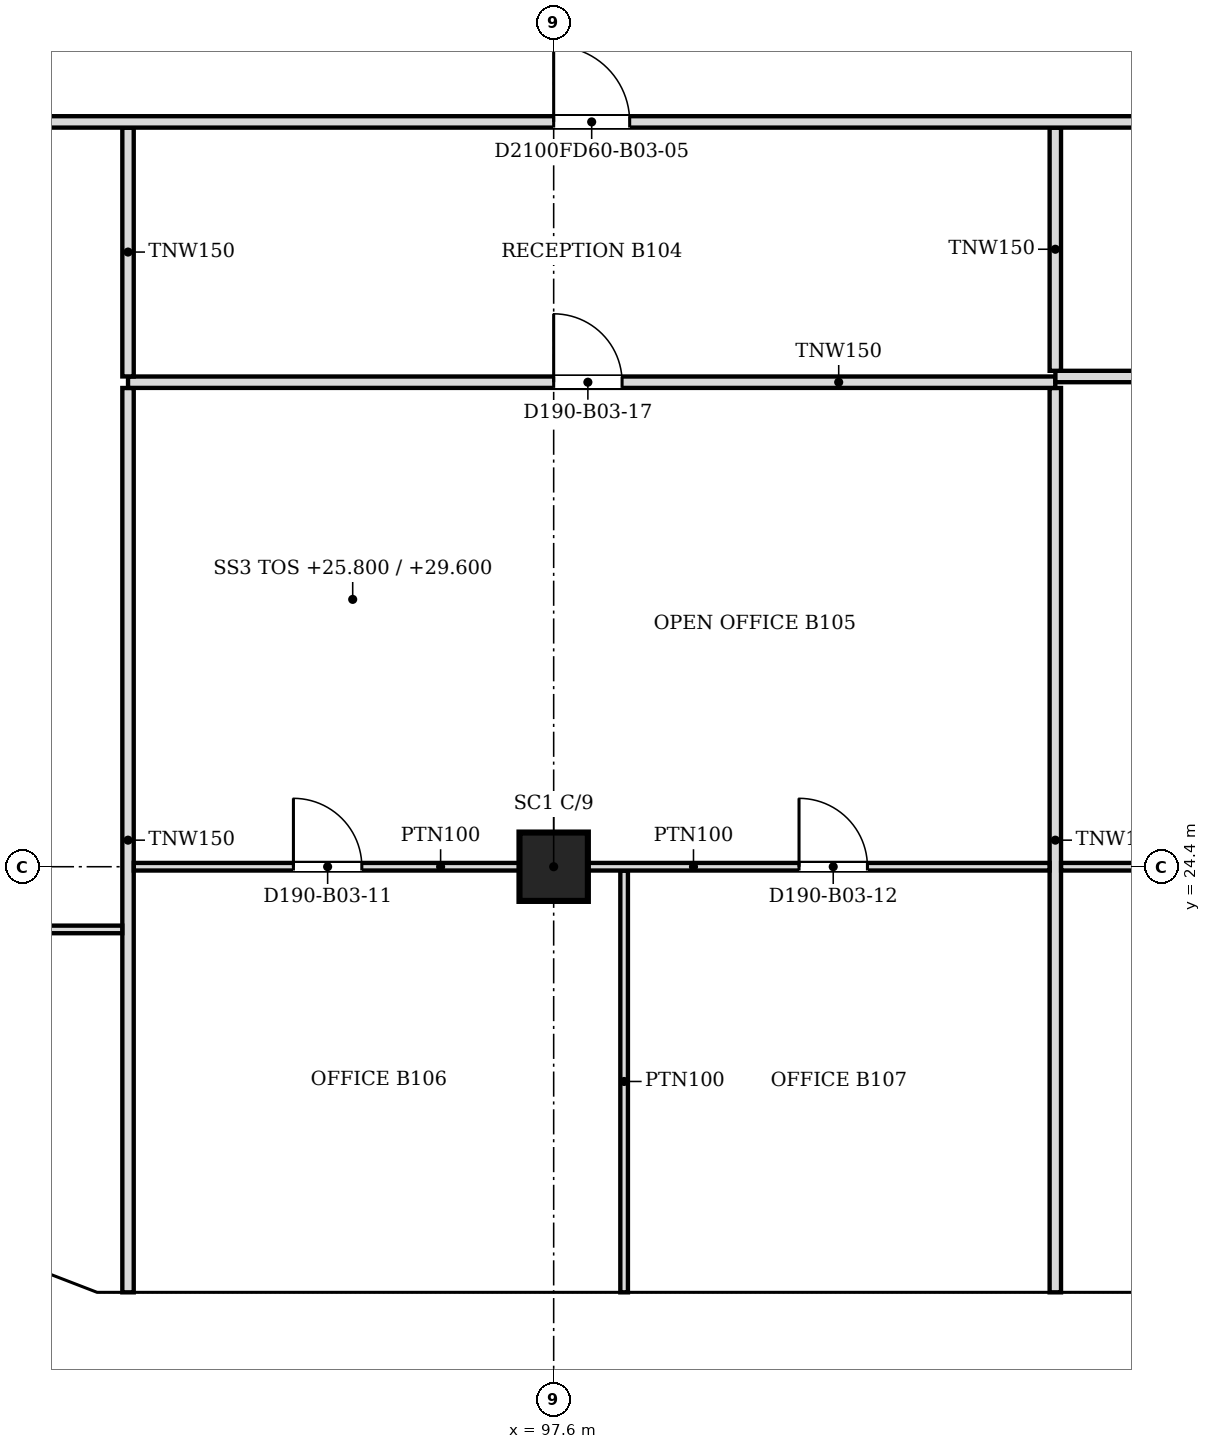
"""IFC4 building model, lengths in metres.
Left out: names, types, materials, properties, quantities, classifications, styles, units other than length and angle.
Written with IfcOpenShell. Run it as: python <this file> out.ifc"""

import sys

from ifc_helpers import new_model, si_unit, direction, frame, frame_2d, origin, origin_2d, place, context, subcontext, project, spatial, polyline, rectangle, outline, extrude, faceted_brep, source, transform, mapped, element, fill, save


model = new_model("IFC4")
c1 = context("Model", 3, precision=1e-05, world=origin(), true_north=direction((0.0, 1.0)))
c2 = subcontext(c1, "Body", "Model", "MODEL_VIEW")
j1 = project(units=[si_unit("LENGTHUNIT", "METRE"), si_unit("PLANEANGLEUNIT", "RADIAN")], contexts=[c1])
p1 = place(None, origin())
s1 = spatial("IfcSite", under=j1, at=p1, CompositionType="ELEMENT")
p2 = place(p1, origin())
s2 = spatial("IfcBuilding", under=s1, at=p2, CompositionType="ELEMENT")
p3 = place(p2, frame((0.0, 0.0, 25.8)))
s3 = spatial("IfcBuildingStorey", under=s2, at=p3, CompositionType="ELEMENT", Elevation=25.8)
p4 = place(p3, frame((97.6, 24.4, 0.0), z_axis=(0.0, 0.0, 1.0), x_axis=(1.0, 0.0, 0.0)))
e1 = element("IfcColumn", 1, at=p4, inside=s3, PredefinedType="COLUMN", context=c2, shape_type="SweptSolid", body=[
    extrude(rectangle(XDim=0.9, YDim=0.9, at=origin_2d()), origin(), (0.0, 0.0, 1.0), 3.6),
])
m1 = source(origin(), c2, "Body", "Brep", [
    faceted_brep([(3.05, -0.25, 0.0), (0.047, -0.25, 3.8), (0.0, -0.25, 3.74), (0.0, -0.25, 0.0), (0.093, 0.25, 3.741), (3.05, 0.25, 0.0), (0.093, 0.25, 0.0), (0.047, 0.0, 3.8)], [[[0, 1, 2, 3]], [[4, 5, 6]], [[5, 4, 7, 1, 0]], [[2, 1, 7]], [[6, 5, 0, 3]], [[6, 3, 2, 7, 4]]]),
])
p5 = place(p3, frame((91.5, 18.55, 0.0), z_axis=(0.0, 0.0, 1.0), x_axis=(1.0, 0.0, 0.0)))
e2 = element("IfcWall", 2, at=p5, inside=s3, PredefinedType="SOLIDWALL", context=c2, shape_type="MappedRepresentation", body=[
    mapped(m1, transform((0.0, 0.0, 0.0), scale=1.0)),
])
m2 = source(origin(), c2, "Body", "SweptSolid", [
    extrude(outline(polyline([(2.534, 0.25), (0.247, 3.144), (0.247, 0.25), (2.534, 0.25)])), frame((0.0, 0.26, 0.0), z_axis=(0.0, -1.0, 0.0), x_axis=(1.0, 0.0, 0.0)), (0.0, 0.0, 1.0), 0.52),
])
p6 = place(p5, origin())
e3 = element("IfcOpeningElement", 3, at=p6, cuts=e2, PredefinedType="OPENING", context=c2, shape_type="MappedRepresentation", body=[
    mapped(m2, transform((0.0, 0.0, 0.0), scale=1.0)),
])
m3 = source(origin(), c2, "Body", "Brep", [
    faceted_brep([(2.997, -0.25, 3.741), (2.95, -0.25, 3.8), (0.0, -0.25, 0.0), (2.997, -0.25, 0.0), (0.053, 0.25, 0.068), (2.904, 0.25, 3.74), (2.904, 0.25, 0.0), (0.053, 0.25, 0.0), (2.95, 0.0, 3.8), (0.0, 0.0, 0.0)], [[[0, 1, 2, 3]], [[4, 5, 6, 7]], [[8, 1, 0]], [[5, 4, 9, 2, 1, 8]], [[7, 6, 3, 2, 9]], [[7, 9, 4]], [[3, 6, 5, 8, 0]]]),
])
p7 = place(p3, frame((88.794, 19.612, 0.0), z_axis=(0.0, 0.0, 1.0), x_axis=(0.933000876937, -0.359874094142, 0.0)))
e4 = element("IfcWall", 4, at=p7, inside=s3, PredefinedType="SOLIDWALL", context=c2, shape_type="MappedRepresentation", body=[
    mapped(m3, transform((0.0, 0.0, 0.0), scale=1.0)),
])
m4 = source(origin(), c2, "Body", "SweptSolid", [
    extrude(outline(polyline([(2.75, 3.135), (0.511, 0.25), (2.75, 0.25), (2.75, 3.135)])), frame((0.0, 0.26, 0.0), z_axis=(0.0, -1.0, 0.0), x_axis=(1.0, 0.0, 0.0)), (0.0, 0.0, 1.0), 0.52),
])
p8 = place(p7, origin())
e5 = element("IfcOpeningElement", 5, at=p8, cuts=e4, PredefinedType="OPENING", context=c2, shape_type="MappedRepresentation", body=[
    mapped(m4, transform((0.0, 0.0, 0.0), scale=1.0)),
])
m5 = source(origin(), c2, "Body", "Brep", [
    faceted_brep([(6.1, -0.25, 0.0), (3.05, -0.25, 3.8), (0.0, -0.25, 0.0), (6.1, -0.25, 0.0), (0.0, 0.25, 0.0), (3.05, 0.25, 3.8), (6.1, 0.25, 0.0), (6.1, 0.25, 0.0)], [[[0, 1, 2, 3]], [[4, 5, 6, 7]], [[6, 5, 1, 0]], [[5, 4, 2, 1]], [[4, 7, 3, 2]], [[3, 7, 6, 0]]]),
])
p9 = place(p3, frame((94.55, 18.55, 0.0), z_axis=(0.0, 0.0, 1.0), x_axis=(1.0, 0.0, 0.0)))
e6 = element("IfcWall", 6, at=p9, inside=s3, PredefinedType="SOLIDWALL", context=c2, shape_type="MappedRepresentation", body=[
    mapped(m5, transform((0.0, 0.0, 0.0), scale=1.0)),
])
m6 = source(origin(), c2, "Body", "SweptSolid", [
    extrude(outline(polyline([(5.579, 0.25), (3.05, 3.401), (0.521, 0.25), (5.579, 0.25)])), frame((0.0, 0.26, 0.0), z_axis=(0.0, -1.0, 0.0), x_axis=(1.0, 0.0, 0.0)), (0.0, 0.0, 1.0), 0.52),
])
p10 = place(p9, origin())
e7 = element("IfcOpeningElement", 7, at=p10, cuts=e6, PredefinedType="OPENING", context=c2, shape_type="MappedRepresentation", body=[
    mapped(m6, transform((0.0, 0.0, 0.0), scale=1.0)),
])
m7 = source(origin(), c2, "Body", "SweptSolid", [
    extrude(outline(polyline([(6.1, 0.0), (3.05, 3.8), (0.0, 0.0), (6.1, 0.0)])), frame((0.0, 0.25, 0.0), z_axis=(0.0, -1.0, 0.0), x_axis=(1.0, 0.0, 0.0)), (0.0, 0.0, 1.0), 0.5),
])
p11 = place(p3, frame((100.65, 18.55, 0.0), z_axis=(0.0, 0.0, 1.0), x_axis=(1.0, 0.0, 0.0)))
e8 = element("IfcWall", 8, at=p11, inside=s3, PredefinedType="SOLIDWALL", context=c2, shape_type="MappedRepresentation", body=[
    mapped(m7, transform((0.0, 0.0, 0.0), scale=1.0)),
])
p12 = place(p11, origin())
e9 = element("IfcOpeningElement", 9, at=p12, cuts=e8, PredefinedType="OPENING", context=c2, shape_type="MappedRepresentation", body=[
    mapped(m6, transform((0.0, 0.0, 0.0), scale=1.0)),
])
p13 = place(p2, frame((0.0, 0.0, 29.6)))
s4 = spatial("IfcBuildingStorey", under=s2, at=p13, CompositionType="ELEMENT", Elevation=29.6)
m8 = source(origin(), c2, "Body", "Brep", [
    faceted_brep([(3.003, -0.25, 0.0), (6.053, -0.25, 3.8), (3.003, -0.25, 7.6), (0.0, -0.25, 3.8), (0.047, 0.25, 3.859), (3.003, 0.25, 7.6), (6.053, 0.25, 3.8), (3.003, 0.25, 0.0), (0.047, 0.25, 3.741), (0.0, 0.0, 3.8)], [[[0, 1, 2, 3]], [[4, 5, 6, 7, 8]], [[7, 6, 1, 0]], [[6, 5, 2, 1]], [[5, 4, 9, 3, 2]], [[8, 7, 0, 3, 9]], [[8, 9, 4]]]),
])
p14 = place(p13, frame((91.547, 18.55, -3.8), z_axis=(0.0, 0.0, 1.0), x_axis=(1.0, 0.0, 0.0)))
e10 = element("IfcWall", 10, at=p14, inside=s4, PredefinedType="SOLIDWALL", context=c2, shape_type="MappedRepresentation", body=[
    mapped(m8, transform((0.0, 0.0, 0.0), scale=1.0)),
])
m9 = source(origin(), c2, "Body", "SweptSolid", [
    extrude(outline(polyline([(3.005, 0.401), (5.733, 3.8), (3.005, 7.199), (0.319, 3.8), (3.005, 0.401)])), frame((0.0, 0.26, 0.0), z_axis=(0.0, -1.0, 0.0), x_axis=(1.0, 0.0, 0.0)), (0.0, 0.0, 1.0), 0.52),
])
p15 = place(p14, origin())
e11 = element("IfcOpeningElement", 11, at=p15, cuts=e10, PredefinedType="OPENING", context=c2, shape_type="MappedRepresentation", body=[
    mapped(m9, transform((0.0, 0.0, 0.0), scale=1.0)),
])
m10 = source(origin(), c2, "Body", "Brep", [
    faceted_brep([(3.05, -0.25, 0.0), (6.1, -0.25, 3.8), (6.1, -0.25, 3.8), (3.05, -0.25, 7.6), (0.0, -0.25, 3.8), (0.0, 0.25, 3.8), (3.05, 0.25, 7.6), (6.1, 0.25, 3.8), (6.1, 0.25, 3.8), (3.05, 0.25, 0.0)], [[[0, 1, 2, 3, 4]], [[5, 6, 7, 8, 9]], [[9, 8, 1, 0]], [[7, 6, 3, 2]], [[6, 5, 4, 3]], [[5, 9, 0, 4]], [[1, 8, 7, 2]]]),
])
p16 = place(p13, frame((97.6, 18.55, -3.8), z_axis=(0.0, 0.0, 1.0), x_axis=(1.0, 0.0, 0.0)))
e12 = element("IfcWall", 12, at=p16, inside=s4, PredefinedType="SOLIDWALL", context=c2, shape_type="MappedRepresentation", body=[
    mapped(m10, transform((0.0, 0.0, 0.0), scale=1.0)),
])
m11 = source(origin(), c2, "Body", "SweptSolid", [
    extrude(outline(polyline([(3.05, 0.399), (5.78, 3.8), (3.05, 7.2), (0.321, 3.8), (3.05, 0.399)])), frame((0.0, 0.26, 0.0), z_axis=(0.0, -1.0, 0.0), x_axis=(1.0, 0.0, 0.0)), (0.0, 0.0, 1.0), 0.52),
])
p17 = place(p16, origin())
e13 = element("IfcOpeningElement", 13, at=p17, cuts=e12, PredefinedType="OPENING", context=c2, shape_type="MappedRepresentation", body=[
    mapped(m11, transform((0.0, 0.0, 0.0), scale=1.0)),
])
m12 = source(origin(), c2, "Body", "SweptSolid", [
    extrude(outline(polyline([(3.05, 0.0), (6.1, 3.8), (3.05, 7.6), (0.0, 3.8), (3.05, 0.0)])), frame((0.0, 0.25, 0.0), z_axis=(0.0, -1.0, 0.0), x_axis=(1.0, 0.0, 0.0)), (0.0, 0.0, 1.0), 0.5),
])
p18 = place(p13, frame((103.7, 18.55, -3.8), z_axis=(0.0, 0.0, 1.0), x_axis=(1.0, 0.0, 0.0)))
e14 = element("IfcWall", 14, at=p18, inside=s4, PredefinedType="SOLIDWALL", context=c2, shape_type="MappedRepresentation", body=[
    mapped(m12, transform((0.0, 0.0, 0.0), scale=1.0)),
])
p19 = place(p18, origin())
e15 = element("IfcOpeningElement", 15, at=p19, cuts=e14, PredefinedType="OPENING", context=c2, shape_type="MappedRepresentation", body=[
    mapped(m11, transform((0.0, 0.0, 0.0), scale=1.0)),
])
m13 = source(origin(), c2, "Body", "Brep", [
    faceted_brep([(0.053, -0.25, 0.0), (3.003, -0.25, 3.8), (0.053, -0.25, 7.6), (0.0, -0.25, 7.531), (0.0, -0.25, 0.068), (0.106, 0.25, 7.532), (2.957, 0.25, 3.86), (2.957, 0.25, 3.74), (0.106, 0.25, 0.068), (3.003, 0.0, 3.8), (0.053, 0.0, 0.0), (0.053, 0.0, 7.6)], [[[0, 1, 2, 3, 4]], [[5, 6, 7, 8]], [[8, 7, 9, 1, 0, 10]], [[6, 5, 11, 2, 1, 9]], [[3, 2, 11]], [[10, 0, 4]], [[8, 10, 4, 3, 11, 5]], [[7, 6, 9]]]),
])
p20 = place(p13, frame((88.744, 19.631, -3.8), z_axis=(0.0, 0.0, 1.0), x_axis=(0.932997369089, -0.359883188373, 0.0)))
e16 = element("IfcWall", 16, at=p20, inside=s4, PredefinedType="SOLIDWALL", context=c2, shape_type="MappedRepresentation", body=[
    mapped(m13, transform((0.0, 0.0, 0.0), scale=1.0)),
])
m14 = source(origin(), c2, "Body", "SweptSolid", [
    extrude(outline(polyline([(0.253, 0.665), (2.687, 3.8), (0.253, 6.935), (0.253, 0.665)])), frame((0.0, 0.26, 0.0), z_axis=(0.0, -1.0, 0.0), x_axis=(1.0, 0.0, 0.0)), (0.0, 0.0, 1.0), 0.52),
])
p21 = place(p20, origin())
e17 = element("IfcOpeningElement", 17, at=p21, cuts=e16, PredefinedType="OPENING", context=c2, shape_type="MappedRepresentation", body=[
    mapped(m14, transform((0.0, 0.0, 0.0), scale=1.0)),
])
p22 = place(p3, frame((92.0, 18.8, 0.0), z_axis=(0.0, 0.0, 1.0), x_axis=(0.0, 1.0, 0.0)))
e18 = element("IfcWall", 18, at=p22, inside=s3, PredefinedType="PARTITIONING", context=c2, shape_type="SweptSolid", body=[
    extrude(rectangle(XDim=11.899, YDim=0.15, at=frame_2d((5.949, 0.0))), origin(), (0.0, 0.0, 1.0), 3.067),
])
p23 = place(p3, frame((98.527, 18.8, 0.0), z_axis=(0.0, 0.0, 1.0), x_axis=(0.0, 1.0, 0.0)))
e19 = element("IfcWall", 19, at=p23, inside=s3, PredefinedType="PARTITIONING", context=c2, shape_type="SweptSolid", body=[
    extrude(rectangle(XDim=5.549, YDim=0.1, at=frame_2d((2.774, 0.0))), origin(), (0.0, 0.0, 1.0), 3.067),
])
p24 = place(p3, frame((104.2, 18.8, 0.0), z_axis=(0.0, 0.0, 1.0), x_axis=(0.0, 1.0, 0.0)))
e20 = element("IfcWall", 20, at=p24, inside=s3, PredefinedType="PARTITIONING", context=c2, shape_type="SweptSolid", body=[
    extrude(rectangle(XDim=11.899, YDim=0.15, at=frame_2d((5.949, 0.0))), origin(), (0.0, 0.0, 1.0), 3.067),
])
p25 = place(p3, frame((91.924, 23.575, 0.0), z_axis=(0.0, 0.0, 1.0), x_axis=(-1.0, 0.0, 0.0)))
e21 = element("IfcWall", 21, at=p25, inside=s3, PredefinedType="PARTITIONING", context=c2, shape_type="SweptSolid", body=[
    extrude(rectangle(XDim=5.67, YDim=0.1, at=frame_2d((2.835, 0.0))), origin(), (0.0, 0.0, 1.0), 3.067),
])
m15 = source(origin(), c2, "Body", "SweptSolid", [
    extrude(rectangle(XDim=0.9, YDim=2.1, at=frame_2d((0.45, 1.05))), frame((0.0, 0.06, 0.0), z_axis=(0.0, -1.0, 0.0), x_axis=(1.0, 0.0, 0.0)), (0.0, 0.0, 1.0), 0.12),
])
p26 = place(p25, frame((2.37, 0.0, 0.0)))
e22 = element("IfcOpeningElement", 22, at=p26, cuts=e21, PredefinedType="OPENING", context=c2, shape_type="MappedRepresentation", body=[
    mapped(m15, transform((0.0, 0.0, 0.0), scale=1.0)),
])
p27 = place(p3, frame((97.149, 24.4, 0.0), z_axis=(0.0, 0.0, 1.0), x_axis=(-1.0, 0.0, 0.0)))
e23 = element("IfcWall", 23, at=p27, inside=s3, PredefinedType="PARTITIONING", context=c2, shape_type="SweptSolid", body=[
    extrude(rectangle(XDim=5.073, YDim=0.1, at=frame_2d((2.537, 0.0))), origin(), (0.0, 0.0, 1.0), 3.067),
])
p28 = place(p27, frame((2.073, 0.0, 0.0)))
e24 = element("IfcOpeningElement", 24, at=p28, cuts=e23, PredefinedType="OPENING", context=c2, shape_type="MappedRepresentation", body=[
    mapped(m15, transform((0.0, 0.0, 0.0), scale=1.0)),
])
p29 = place(p3, frame((104.124, 24.4, 0.0), z_axis=(0.0, 0.0, 1.0), x_axis=(-1.0, 0.0, 0.0)))
e25 = element("IfcWall", 25, at=p29, inside=s3, PredefinedType="PARTITIONING", context=c2, shape_type="SweptSolid", body=[
    extrude(rectangle(XDim=6.073, YDim=0.1, at=frame_2d((3.037, 0.0))), origin(), (0.0, 0.0, 1.0), 3.067),
])
p30 = place(p29, frame((2.396, 0.0, 0.0)))
e26 = element("IfcOpeningElement", 26, at=p30, cuts=e25, PredefinedType="OPENING", context=c2, shape_type="MappedRepresentation", body=[
    mapped(m15, transform((0.0, 0.0, 0.0), scale=1.0)),
])
p31 = place(p3, frame((109.349, 24.4, 0.0), z_axis=(0.0, 0.0, 1.0), x_axis=(-1.0, 0.0, 0.0)))
e27 = element("IfcWall", 27, at=p31, inside=s3, PredefinedType="PARTITIONING", context=c2, shape_type="SweptSolid", body=[
    extrude(rectangle(XDim=5.073, YDim=0.1, at=frame_2d((2.537, 0.0))), origin(), (0.0, 0.0, 1.0), 3.067),
])
p32 = place(p31, frame((2.073, 0.0, 0.0)))
e28 = element("IfcOpeningElement", 28, at=p32, cuts=e27, PredefinedType="OPENING", context=c2, shape_type="MappedRepresentation", body=[
    mapped(m15, transform((0.0, 0.0, 0.0), scale=1.0)),
])
p33 = place(p3, frame((104.2, 30.775, 0.0), z_axis=(0.0, 0.0, 1.0), x_axis=(-1.0, 0.0, 0.0)))
e29 = element("IfcWall", 29, at=p33, inside=s3, PredefinedType="PARTITIONING", context=c2, shape_type="SweptSolid", body=[
    extrude(rectangle(XDim=12.2, YDim=0.15, at=frame_2d((6.1, 0.0))), origin(), (0.0, 0.0, 1.0), 3.067),
])
m16 = source(origin(), c2, "Body", "SweptSolid", [
    extrude(rectangle(XDim=0.9, YDim=2.1, at=frame_2d((0.45, 1.05))), frame((0.0, 0.085, 0.0), z_axis=(0.0, -1.0, 0.0), x_axis=(1.0, 0.0, 0.0)), (0.0, 0.0, 1.0), 0.17),
])
p34 = place(p33, frame((5.7, 0.0, 0.0)))
e30 = element("IfcOpeningElement", 30, at=p34, cuts=e29, PredefinedType="OPENING", context=c2, shape_type="MappedRepresentation", body=[
    mapped(m16, transform((0.0, 0.0, 0.0), scale=1.0)),
])
p35 = place(p3, frame((92.0, 30.851, 0.0), z_axis=(0.0, 0.0, 1.0), x_axis=(0.0, 1.0, 0.0)))
e31 = element("IfcWall", 31, at=p35, inside=s3, PredefinedType="PARTITIONING", context=c2, shape_type="SweptSolid", body=[
    extrude(rectangle(XDim=3.273, YDim=0.15, at=frame_2d((1.636, 0.0))), origin(), (0.0, 0.0, 1.0), 3.067),
])
p36 = place(p3, frame((109.724, 30.85, 0.0), z_axis=(0.0, 0.0, 1.0), x_axis=(-1.0, 0.0, 0.0)))
e32 = element("IfcWall", 32, at=p36, inside=s3, PredefinedType="PARTITIONING", context=c2, shape_type="SweptSolid", body=[
    extrude(rectangle(XDim=5.523, YDim=0.15, at=frame_2d((2.762, 0.0))), origin(), (0.0, 0.0, 1.0), 3.067),
])
p37 = place(p36, frame((2.323, 0.0, 0.0)))
e33 = element("IfcOpeningElement", 33, at=p37, cuts=e32, PredefinedType="OPENING", context=c2, shape_type="MappedRepresentation", body=[
    mapped(m16, transform((0.0, 0.0, 0.0), scale=1.0)),
])
p38 = place(p3, frame((104.2, 30.925, 0.0), z_axis=(0.0, 0.0, 1.0), x_axis=(0.0, 1.0, 0.0)))
e34 = element("IfcWall", 34, at=p38, inside=s3, PredefinedType="PARTITIONING", context=c2, shape_type="SweptSolid", body=[
    extrude(rectangle(XDim=3.199, YDim=0.15, at=frame_2d((1.6, 0.0))), origin(), (0.0, 0.0, 1.0), 3.067),
])
p39 = place(p3, frame((133.7, 34.2, 0.0), z_axis=(0.0, 0.0, 1.0), x_axis=(-1.0, 0.0, 0.0)))
e35 = element("IfcWall", 35, at=p39, inside=s3, PredefinedType="PARTITIONING", context=c2, shape_type="SweptSolid", body=[
    extrude(rectangle(XDim=47.8, YDim=0.15, at=frame_2d((23.9, 0.0))), origin(), (0.0, 0.0, 1.0), 3.067),
])
p40 = place(p39, frame((2.099, 0.0, 0.0)))
e36 = element("IfcOpeningElement", 36, at=p40, cuts=e35, PredefinedType="OPENING", context=c2, shape_type="MappedRepresentation", body=[
    mapped(m16, transform((0.0, 0.0, 0.0), scale=1.0)),
])
m17 = source(origin(), c2, "Body", "SweptSolid", [
    extrude(rectangle(XDim=1.0, YDim=2.1, at=frame_2d((0.5, 1.05))), frame((0.0, 0.085, 0.0), z_axis=(0.0, -1.0, 0.0), x_axis=(1.0, 0.0, 0.0)), (0.0, 0.0, 1.0), 0.17),
])
p41 = place(p39, frame((26.199, 0.0, 0.0)))
e37 = element("IfcOpeningElement", 37, at=p41, cuts=e35, PredefinedType="OPENING", context=c2, shape_type="MappedRepresentation", body=[
    mapped(m17, transform((0.0, 0.0, 0.0), scale=1.0)),
])
p42 = place(p39, frame((44.3, 0.0, 0.0)))
e38 = element("IfcOpeningElement", 38, at=p42, cuts=e35, PredefinedType="OPENING", context=c2, shape_type="MappedRepresentation", body=[
    mapped(m16, transform((0.0, 0.0, 0.0), scale=1.0)),
])
p43 = place(p39, frame((9.249, 0.0, 0.0)))
e39 = element("IfcOpeningElement", 39, at=p43, cuts=e35, PredefinedType="OPENING", context=c2, shape_type="MappedRepresentation", body=[
    mapped(m16, transform((0.0, 0.0, 0.0), scale=1.0)),
])
p44 = place(p39, frame((18.6, 0.0, 0.0)))
e40 = element("IfcOpeningElement", 40, at=p44, cuts=e35, PredefinedType="OPENING", context=c2, shape_type="MappedRepresentation", body=[
    mapped(m17, transform((0.0, 0.0, 0.0), scale=1.0)),
])
p45 = place(p39, frame((35.1, 0.0, 0.0)))
e41 = element("IfcOpeningElement", 41, at=p45, cuts=e35, PredefinedType="OPENING", context=c2, shape_type="MappedRepresentation", body=[
    mapped(m17, transform((0.0, 0.0, 0.0), scale=1.0)),
])
m18 = source(origin(), c2, "Body", "SweptSolid", [
    extrude(rectangle(XDim=0.9, YDim=2.1, at=frame_2d((0.45, 1.05))), frame((0.0, 0.025, 0.0), z_axis=(0.0, -1.0, 0.0), x_axis=(1.0, 0.0, 0.0)), (0.0, 0.0, 1.0), 0.05),
])
p46 = place(p28, origin())
e42 = element("IfcDoor", 42, at=p46, inside=s3, OperationType="SINGLE_SWING_RIGHT", PredefinedType="DOOR", context=c2, shape_type="MappedRepresentation", body=[
    mapped(m18, transform((0.0, 0.0, 0.0), scale=1.0)),
])
fill(e24, e42)
p47 = place(p30, origin())
e43 = element("IfcDoor", 43, at=p47, inside=s3, OperationType="SINGLE_SWING_RIGHT", PredefinedType="DOOR", context=c2, shape_type="MappedRepresentation", body=[
    mapped(m18, transform((0.0, 0.0, 0.0), scale=1.0)),
])
fill(e26, e43)
m19 = source(origin(), c2, "Body", "SweptSolid", [
    extrude(rectangle(XDim=1.0, YDim=2.1, at=frame_2d((0.5, 1.05))), frame((0.0, 0.025, 0.0), z_axis=(0.0, -1.0, 0.0), x_axis=(1.0, 0.0, 0.0)), (0.0, 0.0, 1.0), 0.05),
])
p48 = place(p45, origin())
e44 = element("IfcDoor", 44, at=p48, inside=s3, OperationType="SINGLE_SWING_RIGHT", PredefinedType="DOOR", context=c2, shape_type="MappedRepresentation", body=[
    mapped(m19, transform((0.0, 0.0, 0.0), scale=1.0)),
])
fill(e41, e44)
p49 = place(p34, origin())
e45 = element("IfcDoor", 45, at=p49, inside=s3, OperationType="SINGLE_SWING_RIGHT", PredefinedType="DOOR", context=c2, shape_type="MappedRepresentation", body=[
    mapped(m18, transform((0.0, 0.0, 0.0), scale=1.0)),
])
fill(e30, e45)
save(model, sys.argv[1])
